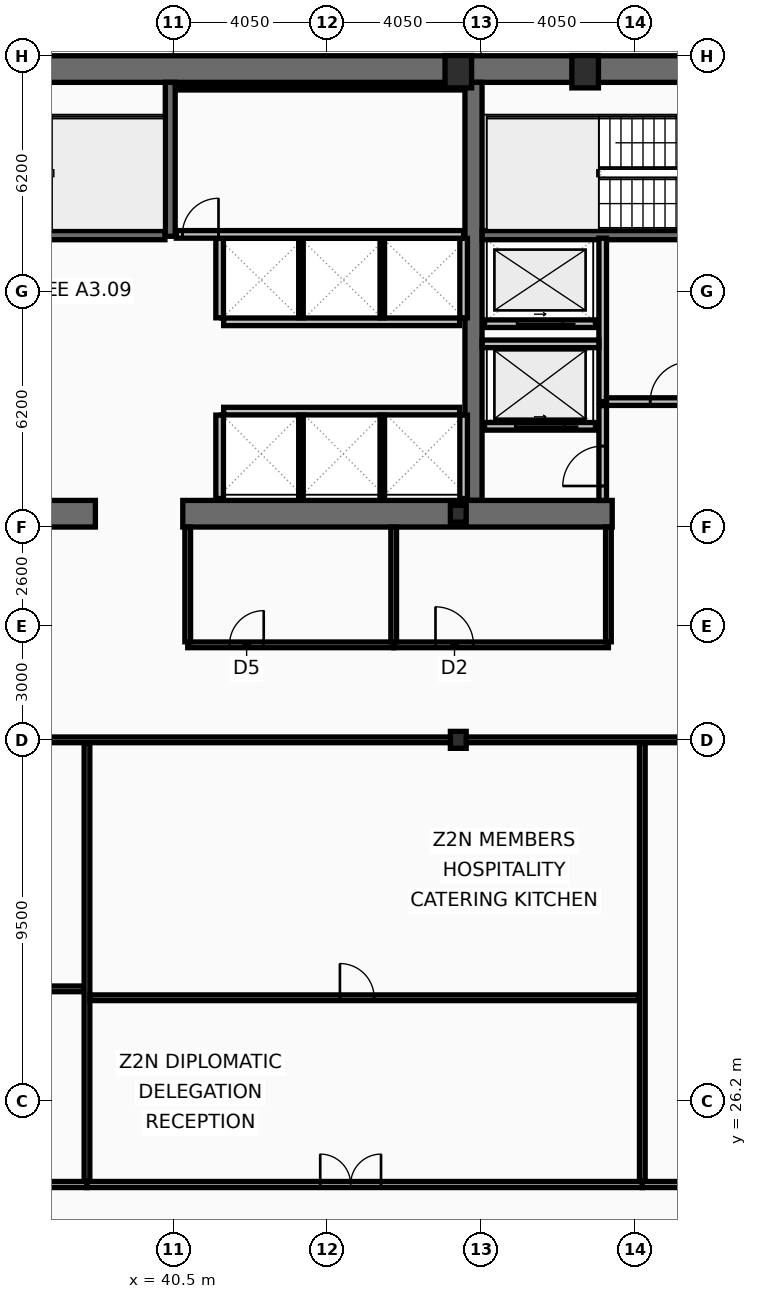
"""IFC4 building model, lengths in metres.
Left out: names, types, materials, properties, quantities, classifications, styles, units other than length and angle.
Written with IfcOpenShell. Run it as: python <this file> out.ifc"""

import sys

from ifc_helpers import new_model, si_unit, direction, frame, frame_2d, origin, origin_2d, place, context, subcontext, project, spatial, rectangle, hollow_rectangle, i_section, extrude, element, fill, save


model = new_model("IFC4")
c1 = context("Model", 3, precision=1e-05, world=origin(), true_north=direction((0.0, 1.0)))
c2 = subcontext(c1, "Body", "Model", "MODEL_VIEW")
j1 = project(units=[si_unit("LENGTHUNIT", "METRE"), si_unit("PLANEANGLEUNIT", "RADIAN")], contexts=[c1])
p1 = place(None, origin())
s1 = spatial("IfcSite", under=j1, at=p1, CompositionType="ELEMENT")
p2 = place(p1, origin())
s2 = spatial("IfcBuilding", under=s1, at=p2, CompositionType="ELEMENT")
p3 = place(p2, frame((0.0, 0.0, 125.4)))
s3 = spatial("IfcBuildingStorey", under=s2, at=p3, CompositionType="ELEMENT", Elevation=125.4)
p4 = place(p3, frame((16.2, 53.35, 0.0), z_axis=(0.0, 0.0, 1.0), x_axis=(1.0, 0.0, 0.0)))
e1 = element("IfcWall", 1, at=p4, inside=s3, PredefinedType="SHEAR", context=c2, shape_type="SweptSolid", body=[
    extrude(rectangle(XDim=40.5, YDim=0.7, at=frame_2d((20.25, 0.0))), origin(), (0.0, 0.0, 1.0), 3.44),
])
p5 = place(p3, frame((48.4, 42.0, 0.0), z_axis=(0.0, 0.0, 1.0), x_axis=(0.0, 1.0, 0.0)))
e2 = element("IfcWall", 2, at=p5, inside=s3, PredefinedType="SHEAR", context=c2, shape_type="SweptSolid", body=[
    extrude(rectangle(XDim=11.0, YDim=0.45, at=frame_2d((5.5, 0.0))), origin(), (0.0, 0.0, 1.0), 3.44),
])
p6 = place(p3, frame((38.45, 41.65, 0.0), z_axis=(0.0, 0.0, 1.0), x_axis=(-1.0, 0.0, 0.0)))
e3 = element("IfcWall", 3, at=p6, inside=s3, PredefinedType="SHEAR", context=c2, shape_type="SweptSolid", body=[
    extrude(rectangle(XDim=3.75, YDim=0.7, at=frame_2d((1.875, 0.0))), origin(), (0.0, 0.0, 1.0), 3.44),
])
p7 = place(p3, frame((52.05, 41.65, 0.0), z_axis=(0.0, 0.0, 1.0), x_axis=(-1.0, 0.0, 0.0)))
e4 = element("IfcWall", 4, at=p7, inside=s3, PredefinedType="SHEAR", context=c2, shape_type="SweptSolid", body=[
    extrude(rectangle(XDim=11.3, YDim=0.7, at=frame_2d((5.65, 0.0))), origin(), (0.0, 0.0, 1.0), 3.44),
])
p8 = place(p3, frame((40.42, 48.95, 0.0), z_axis=(0.0, 0.0, 1.0), x_axis=(0.0, 1.0, 0.0)))
e5 = element("IfcWall", 5, at=p8, inside=s3, PredefinedType="SHEAR", context=c2, shape_type="SweptSolid", body=[
    extrude(rectangle(XDim=4.05, YDim=0.26, at=frame_2d((2.025, 0.0))), origin(), (0.0, 0.0, 1.0), 3.44),
])
p9 = place(p3, frame((48.63, 48.98, 0.0), z_axis=(0.0, 0.0, 1.0), x_axis=(1.0, 0.0, 0.0)))
e6 = element("IfcWall", 6, at=p9, inside=s3, PredefinedType="SHEAR", context=c2, shape_type="SweptSolid", body=[
    extrude(rectangle(XDim=7.37, YDim=0.24, at=frame_2d((3.685, 0.0))), origin(), (0.0, 0.0, 1.0), 3.44),
])
p10 = place(p9, frame((6.1, 0.0, 0.0)))
e7 = element("IfcOpeningElement", 7, at=p10, cuts=e6, PredefinedType="OPENING", context=c2, shape_type="SweptSolid", body=[
    extrude(rectangle(XDim=1.05, YDim=2.15, at=frame_2d((0.525, 1.075))), frame((0.0, 0.13, 0.0), z_axis=(0.0, -1.0, 0.0), x_axis=(1.0, 0.0, 0.0)), (0.0, 0.0, 1.0), 0.26),
])
p11 = place(p3, frame((32.72, 48.98, 0.0), z_axis=(0.0, 0.0, 1.0), x_axis=(1.0, 0.0, 0.0)))
e8 = element("IfcWall", 8, at=p11, inside=s3, PredefinedType="SHEAR", context=c2, shape_type="SweptSolid", body=[
    extrude(rectangle(XDim=7.56, YDim=0.24, at=frame_2d((3.78, 0.0))), origin(), (0.0, 0.0, 1.0), 3.44),
])
p12 = place(p11, frame((0.22, 0.0, 0.0)))
e9 = element("IfcOpeningElement", 9, at=p12, cuts=e8, PredefinedType="OPENING", context=c2, shape_type="SweptSolid", body=[
    extrude(rectangle(XDim=1.05, YDim=2.15, at=frame_2d((0.525, 1.075))), frame((0.0, 0.13, 0.0), z_axis=(0.0, -1.0, 0.0), x_axis=(1.0, 0.0, 0.0)), (0.0, 0.0, 1.0), 0.26),
])
for number, where, z_axis, x_axis in (
    (10, (48.0, 53.28, 0.0), (0.0, 0.0, 1.0), (1.0, 0.0, 0.0)),
    (11, (51.337, 53.28, 0.0), (0.0, 0.0, 1.0), (1.0, 0.0, 0.0)),
):
    element("IfcColumn", number, at=place(p3, frame(where, z_axis=z_axis, x_axis=x_axis)), inside=s3, PredefinedType="COLUMN", context=c2, shape_type="SweptSolid", body=[
        extrude(hollow_rectangle(XDim=0.7, YDim=0.85, WallThickness=0.05, at=origin_2d()), origin(), (0.0, 0.0, 1.0), 3.6),
    ])
for number, where, z_axis, x_axis in (
    (12, (48.0, 35.7, 0.0), (0.0, 0.0, 1.0), (1.0, 0.0, 0.0)),
    (13, (48.0, 41.65, 0.0), (0.0, 0.0, 1.0), (1.0, 0.0, 0.0)),
):
    element("IfcColumn", number, at=place(p3, frame(where, z_axis=z_axis, x_axis=x_axis)), inside=s3, PredefinedType="COLUMN", context=c2, shape_type="SweptSolid", body=[
        extrude(i_section(OverallWidth=0.416, OverallDepth=0.446, WebThickness=0.039, FlangeThickness=0.063, at=origin_2d()), origin(), (0.0, 0.0, 1.0), 3.6),
    ])
p13 = place(p3, frame((51.61, 43.95, 0.0), z_axis=(0.0, 0.0, 1.0), x_axis=(-1.0, 0.0, 0.0)))
e14 = element("IfcWall", 14, at=p13, inside=s3, PredefinedType="PARTITIONING", context=c2, shape_type="SweptSolid", body=[
    extrude(rectangle(XDim=2.92, YDim=0.2, at=frame_2d((1.46, 0.0))), origin(), (0.0, 0.0, 1.0), 3.44),
])
p14 = place(p13, frame((0.81, 0.0, 0.0)))
e15 = element("IfcOpeningElement", 15, at=p14, cuts=e14, PredefinedType="OPENING", context=c2, shape_type="SweptSolid", body=[
    extrude(rectangle(XDim=1.3, YDim=2.18, at=frame_2d((0.65, 1.09))), frame((0.0, 0.11, 0.0), z_axis=(0.0, -1.0, 0.0), x_axis=(1.0, 0.0, 0.0)), (0.0, 0.0, 1.0), 0.22),
])
p15 = place(p3, frame((51.61, 46.65, 0.0), z_axis=(0.0, 0.0, 1.0), x_axis=(-1.0, 0.0, 0.0)))
e16 = element("IfcWall", 16, at=p15, inside=s3, PredefinedType="PARTITIONING", context=c2, shape_type="SweptSolid", body=[
    extrude(rectangle(XDim=2.92, YDim=0.2, at=frame_2d((1.46, 0.0))), origin(), (0.0, 0.0, 1.0), 3.44),
])
p16 = place(p15, frame((0.86, 0.0, 0.0)))
e17 = element("IfcOpeningElement", 17, at=p16, cuts=e16, PredefinedType="OPENING", context=c2, shape_type="SweptSolid", body=[
    extrude(rectangle(XDim=1.2, YDim=2.18, at=frame_2d((0.6, 1.09))), frame((0.0, 0.11, 0.0), z_axis=(0.0, -1.0, 0.0), x_axis=(1.0, 0.0, 0.0)), (0.0, 0.0, 1.0), 0.22),
])
p17 = place(p3, frame((51.8, 44.6, 0.0), z_axis=(0.0, 0.0, 1.0), x_axis=(0.0, 1.0, 0.0)))
e18 = element("IfcWall", 18, at=p17, inside=s3, PredefinedType="PARTITIONING", context=c2, shape_type="SweptSolid", body=[
    extrude(rectangle(XDim=4.3, YDim=0.2, at=frame_2d((2.15, 0.0))), origin(), (0.0, 0.0, 1.0), 3.44),
])
p18 = place(p3, frame((51.9, 44.6, 0.0), z_axis=(0.0, 0.0, 1.0), x_axis=(1.0, 0.0, 0.0)))
e19 = element("IfcWall", 19, at=p18, inside=s3, PredefinedType="PARTITIONING", context=c2, shape_type="SweptSolid", body=[
    extrude(rectangle(XDim=4.1, YDim=0.2, at=frame_2d((2.05, 0.0))), origin(), (0.0, 0.0, 1.0), 3.44),
])
p19 = place(p18, frame((1.15, 0.0, 0.0)))
e20 = element("IfcOpeningElement", 20, at=p19, cuts=e19, PredefinedType="OPENING", context=c2, shape_type="SweptSolid", body=[
    extrude(rectangle(XDim=1.05, YDim=2.15, at=frame_2d((0.525, 1.075))), frame((0.0, 0.11, 0.0), z_axis=(0.0, -1.0, 0.0), x_axis=(1.0, 0.0, 0.0)), (0.0, 0.0, 1.0), 0.22),
])
p20 = place(p3, frame((48.63, 46.12, 0.0), z_axis=(0.0, 0.0, 1.0), x_axis=(1.0, 0.0, 0.0)))
e21 = element("IfcWall", 21, at=p20, inside=s3, PredefinedType="PARTITIONING", context=c2, shape_type="SweptSolid", body=[
    extrude(rectangle(XDim=3.07, YDim=0.2, at=frame_2d((1.535, 0.0))), origin(), (0.0, 0.0, 1.0), 3.44),
])
p21 = place(p3, frame((51.8, 42.0, 0.0), z_axis=(0.0, 0.0, 1.0), x_axis=(0.0, 1.0, 0.0)))
e22 = element("IfcWall", 22, at=p21, inside=s3, PredefinedType="PARTITIONING", context=c2, shape_type="SweptSolid", body=[
    extrude(rectangle(XDim=2.495, YDim=0.2, at=frame_2d((1.248, 0.0))), origin(), (0.0, 0.0, 1.0), 3.44),
])
p22 = place(p21, frame((0.38, 0.0, 0.0)))
e23 = element("IfcOpeningElement", 23, at=p22, cuts=e22, PredefinedType="OPENING", context=c2, shape_type="SweptSolid", body=[
    extrude(rectangle(XDim=1.05, YDim=2.15, at=frame_2d((0.525, 1.075))), frame((0.0, 0.11, 0.0), z_axis=(0.0, -1.0, 0.0), x_axis=(1.0, 0.0, 0.0)), (0.0, 0.0, 1.0), 0.22),
])
p23 = place(p3, frame((41.825, 46.7, 0.0), z_axis=(0.0, 0.0, 1.0), x_axis=(1.0, 0.0, 0.0)))
e24 = element("IfcWall", 24, at=p23, inside=s3, PredefinedType="PARTITIONING", context=c2, shape_type="SweptSolid", body=[
    extrude(rectangle(XDim=6.21, YDim=0.2, at=frame_2d((3.105, 0.0))), origin(), (0.0, 0.0, 1.0), 3.44),
])
for number, where, z_axis, x_axis in (
    (25, (41.72, 46.805, 0.0), (0.0, 0.0, 1.0), (0.0, 1.0, 0.0)),
    (26, (48.14, 46.805, 0.0), (0.0, 0.0, 1.0), (0.0, 1.0, 0.0)),
):
    element("IfcWall", number, at=place(p3, frame(where, z_axis=z_axis, x_axis=x_axis)), inside=s3, PredefinedType="PARTITIONING", context=c2, shape_type="SweptSolid", body=[
        extrude(rectangle(XDim=2.09, YDim=0.2, at=frame_2d((1.045, 0.0))), origin(), (0.0, 0.0, 1.0), 3.44),
    ])
for number, where, z_axis, x_axis in (
    (27, (43.86, 46.805, 0.0), (0.0, 0.0, 1.0), (0.0, 1.0, 0.0)),
    (28, (46.0, 46.805, 0.0), (0.0, 0.0, 1.0), (0.0, 1.0, 0.0)),
):
    element("IfcWall", number, at=place(p3, frame(where, z_axis=z_axis, x_axis=x_axis)), inside=s3, PredefinedType="PARTITIONING", context=c2, shape_type="SweptSolid", body=[
        extrude(rectangle(XDim=2.09, YDim=0.12, at=frame_2d((1.045, 0.0))), origin(), (0.0, 0.0, 1.0), 3.44),
    ])
p24 = place(p3, frame((41.825, 44.35, 0.0), z_axis=(0.0, 0.0, 1.0), x_axis=(1.0, 0.0, 0.0)))
e29 = element("IfcWall", 29, at=p24, inside=s3, PredefinedType="PARTITIONING", context=c2, shape_type="SweptSolid", body=[
    extrude(rectangle(XDim=6.21, YDim=0.2, at=frame_2d((3.105, 0.0))), origin(), (0.0, 0.0, 1.0), 3.44),
])
for number, where, z_axis, x_axis in (
    (30, (41.72, 42.05, 0.0), (0.0, 0.0, 1.0), (0.0, 1.0, 0.0)),
    (31, (48.14, 42.05, 0.0), (0.0, 0.0, 1.0), (0.0, 1.0, 0.0)),
):
    element("IfcWall", number, at=place(p3, frame(where, z_axis=z_axis, x_axis=x_axis)), inside=s3, PredefinedType="PARTITIONING", context=c2, shape_type="SweptSolid", body=[
        extrude(rectangle(XDim=2.195, YDim=0.2, at=frame_2d((1.098, 0.0))), origin(), (0.0, 0.0, 1.0), 3.44),
    ])
for number, where, z_axis, x_axis in (
    (32, (43.86, 42.05, 0.0), (0.0, 0.0, 1.0), (0.0, 1.0, 0.0)),
    (33, (46.0, 42.05, 0.0), (0.0, 0.0, 1.0), (0.0, 1.0, 0.0)),
):
    element("IfcWall", number, at=place(p3, frame(where, z_axis=z_axis, x_axis=x_axis)), inside=s3, PredefinedType="PARTITIONING", context=c2, shape_type="SweptSolid", body=[
        extrude(rectangle(XDim=2.195, YDim=0.12, at=frame_2d((1.098, 0.0))), origin(), (0.0, 0.0, 1.0), 3.44),
    ])
p25 = place(p3, frame((40.58, 52.86, 0.0), z_axis=(0.0, 0.0, 1.0), x_axis=(1.0, 0.0, 0.0)))
e34 = element("IfcWall", 34, at=p25, inside=s3, PredefinedType="PARTITIONING", context=c2, shape_type="SweptSolid", body=[
    extrude(rectangle(XDim=7.56, YDim=0.12, at=frame_2d((3.78, 0.0))), origin(), (0.0, 0.0, 1.0), 3.44),
])
p26 = place(p3, frame((40.58, 49.0, 0.0), z_axis=(0.0, 0.0, 1.0), x_axis=(1.0, 0.0, 0.0)))
e35 = element("IfcWall", 35, at=p26, inside=s3, PredefinedType="PARTITIONING", context=c2, shape_type="SweptSolid", body=[
    extrude(rectangle(XDim=7.56, YDim=0.2, at=frame_2d((3.78, 0.0))), origin(), (0.0, 0.0, 1.0), 3.44),
])
p27 = place(p26, frame((0.16, 0.0, 0.0)))
e36 = element("IfcOpeningElement", 36, at=p27, cuts=e35, PredefinedType="OPENING", context=c2, shape_type="SweptSolid", body=[
    extrude(rectangle(XDim=0.95, YDim=2.1, at=frame_2d((0.475, 1.05))), frame((0.0, 0.11, 0.0), z_axis=(0.0, -1.0, 0.0), x_axis=(1.0, 0.0, 0.0)), (0.0, 0.0, 1.0), 0.22),
])
p28 = place(p3, frame((40.88, 38.2, 0.0), z_axis=(0.0, 0.0, 1.0), x_axis=(1.0, 0.0, 0.0)))
e37 = element("IfcWall", 37, at=p28, inside=s3, PredefinedType="PARTITIONING", context=c2, shape_type="SweptSolid", body=[
    extrude(rectangle(XDim=5.42, YDim=0.15, at=frame_2d((2.71, 0.0))), origin(), (0.0, 0.0, 1.0), 2.73),
])
p29 = place(p28, frame((1.1, 0.0, 0.0)))
e38 = element("IfcOpeningElement", 38, at=p29, cuts=e37, PredefinedType="OPENING", context=c2, shape_type="SweptSolid", body=[
    extrude(rectangle(XDim=0.9, YDim=2.05, at=frame_2d((0.45, 1.025))), frame((0.0, 0.085, 0.0), z_axis=(0.0, -1.0, 0.0), x_axis=(1.0, 0.0, 0.0)), (0.0, 0.0, 1.0), 0.17),
])
p30 = place(p3, frame((46.3, 38.2, 0.0), z_axis=(0.0, 0.0, 1.0), x_axis=(1.0, 0.0, 0.0)))
e39 = element("IfcWall", 39, at=p30, inside=s3, PredefinedType="PARTITIONING", context=c2, shape_type="SweptSolid", body=[
    extrude(rectangle(XDim=5.65, YDim=0.15, at=frame_2d((2.825, 0.0))), origin(), (0.0, 0.0, 1.0), 2.73),
])
p31 = place(p30, frame((1.1, 0.0, 0.0)))
e40 = element("IfcOpeningElement", 40, at=p31, cuts=e39, PredefinedType="OPENING", context=c2, shape_type="SweptSolid", body=[
    extrude(rectangle(XDim=1.0, YDim=2.05, at=frame_2d((0.5, 1.025))), frame((0.0, 0.085, 0.0), z_axis=(0.0, -1.0, 0.0), x_axis=(1.0, 0.0, 0.0)), (0.0, 0.0, 1.0), 0.17),
])
for number, where, z_axis, x_axis in (
    (41, (40.88, 38.28, 0.0), (0.0, 0.0, 1.0), (0.0, 1.0, 0.0)),
    (42, (46.3, 38.28, 0.0), (0.0, 0.0, 1.0), (0.0, 1.0, 0.0)),
    (43, (51.95, 38.28, 0.0), (0.0, 0.0, 1.0), (0.0, 1.0, 0.0)),
):
    element("IfcWall", number, at=place(p3, frame(where, z_axis=z_axis, x_axis=x_axis)), inside=s3, PredefinedType="PARTITIONING", context=c2, shape_type="SweptSolid", body=[
        extrude(rectangle(XDim=3.02, YDim=0.15, at=frame_2d((1.51, 0.0))), origin(), (0.0, 0.0, 1.0), 3.44),
    ])
p32 = place(p3, frame((21.81, 35.7, 0.0), z_axis=(0.0, 0.0, 1.0), x_axis=(1.0, 0.0, 0.0)))
e44 = element("IfcWall", 44, at=p32, inside=s3, PredefinedType="PARTITIONING", context=c2, shape_type="SweptSolid", body=[
    extrude(rectangle(XDim=46.995, YDim=0.15, at=frame_2d((23.498, 0.0))), origin(), (0.0, 0.0, 1.0), 2.73),
])
p33 = place(p3, frame((30.215, 24.0, 0.0), z_axis=(0.0, 0.0, 1.0), x_axis=(1.0, 0.0, 0.0)))
e45 = element("IfcWall", 45, at=p33, inside=s3, PredefinedType="PARTITIONING", context=c2, shape_type="SweptSolid", body=[
    extrude(rectangle(XDim=8.014, YDim=0.16, at=frame_2d((4.007, 0.0))), origin(), (0.0, 0.0, 1.0), 2.73),
])
p34 = place(p33, frame((3.366, 0.0, 0.0)))
e46 = element("IfcOpeningElement", 46, at=p34, cuts=e45, PredefinedType="OPENING", context=c2, shape_type="SweptSolid", body=[
    extrude(rectangle(XDim=1.0, YDim=2.05, at=frame_2d((0.5, 1.025))), frame((0.0, 0.09, 0.0), z_axis=(0.0, -1.0, 0.0), x_axis=(1.0, 0.0, 0.0)), (0.0, 0.0, 1.0), 0.18),
])
p35 = place(p3, frame((30.295, 29.148, 0.0), z_axis=(0.0, 0.0, 1.0), x_axis=(1.0, 0.0, 0.0)))
e47 = element("IfcWall", 47, at=p35, inside=s3, PredefinedType="PARTITIONING", context=c2, shape_type="SweptSolid", body=[
    extrude(rectangle(XDim=7.854, YDim=0.15, at=frame_2d((3.927, 0.0))), origin(), (0.0, 0.0, 1.0), 2.73),
])
p36 = place(p35, frame((3.606, 0.0, 0.0)))
e48 = element("IfcOpeningElement", 48, at=p36, cuts=e47, PredefinedType="OPENING", context=c2, shape_type="SweptSolid", body=[
    extrude(rectangle(XDim=0.9, YDim=2.05, at=frame_2d((0.45, 1.025))), frame((0.0, 0.085, 0.0), z_axis=(0.0, -1.0, 0.0), x_axis=(1.0, 0.0, 0.0)), (0.0, 0.0, 1.0), 0.17),
])
p37 = place(p3, frame((38.229, 24.0, 0.0), z_axis=(0.0, 0.0, 1.0), x_axis=(1.0, 0.0, 0.0)))
e49 = element("IfcWall", 49, at=p37, inside=s3, PredefinedType="PARTITIONING", context=c2, shape_type="SweptSolid", body=[
    extrude(rectangle(XDim=14.613, YDim=0.16, at=frame_2d((7.307, 0.0))), origin(), (0.0, 0.0, 1.0), 2.73),
])
p38 = place(p37, frame((6.138, 0.0, 0.0)))
e50 = element("IfcOpeningElement", 50, at=p38, cuts=e49, PredefinedType="OPENING", context=c2, shape_type="SweptSolid", body=[
    extrude(rectangle(XDim=1.6, YDim=2.15, at=frame_2d((0.8, 1.075))), frame((0.0, 0.09, 0.0), z_axis=(0.0, -1.0, 0.0), x_axis=(1.0, 0.0, 0.0)), (0.0, 0.0, 1.0), 0.18),
])
p39 = place(p3, frame((38.229, 24.085, 0.0), z_axis=(0.0, 0.0, 1.0), x_axis=(0.0, 1.0, 0.0)))
e51 = element("IfcWall", 51, at=p39, inside=s3, PredefinedType="PARTITIONING", context=c2, shape_type="SweptSolid", body=[
    extrude(rectangle(XDim=11.535, YDim=0.15, at=frame_2d((5.768, 0.0))), origin(), (0.0, 0.0, 1.0), 2.88),
])
p40 = place(p3, frame((38.309, 28.914, 0.0), z_axis=(0.0, 0.0, 1.0), x_axis=(1.0, 0.0, 0.0)))
e52 = element("IfcWall", 52, at=p40, inside=s3, PredefinedType="PARTITIONING", context=c2, shape_type="SweptSolid", body=[
    extrude(rectangle(XDim=14.453, YDim=0.15, at=frame_2d((7.227, 0.0))), origin(), (0.0, 0.0, 1.0), 2.73),
])
p41 = place(p40, frame((6.576, 0.0, 0.0)))
e53 = element("IfcOpeningElement", 53, at=p41, cuts=e52, PredefinedType="OPENING", context=c2, shape_type="SweptSolid", body=[
    extrude(rectangle(XDim=0.9, YDim=2.05, at=frame_2d((0.45, 1.025))), frame((0.0, 0.085, 0.0), z_axis=(0.0, -1.0, 0.0), x_axis=(1.0, 0.0, 0.0)), (0.0, 0.0, 1.0), 0.17),
])
p42 = place(p3, frame((52.842, 24.0, 0.0), z_axis=(0.0, 0.0, 1.0), x_axis=(1.0, 0.0, 0.0)))
e54 = element("IfcWall", 54, at=p42, inside=s3, PredefinedType="PARTITIONING", context=c2, shape_type="SweptSolid", body=[
    extrude(rectangle(XDim=7.542, YDim=0.16, at=frame_2d((3.771, 0.0))), origin(), (0.0, 0.0, 1.0), 2.73),
])
p43 = place(p42, frame((3.168, 0.0, 0.0)))
e55 = element("IfcOpeningElement", 55, at=p43, cuts=e54, PredefinedType="OPENING", context=c2, shape_type="SweptSolid", body=[
    extrude(rectangle(XDim=1.0, YDim=2.05, at=frame_2d((0.5, 1.025))), frame((0.0, 0.09, 0.0), z_axis=(0.0, -1.0, 0.0), x_axis=(1.0, 0.0, 0.0)), (0.0, 0.0, 1.0), 0.18),
])
p44 = place(p3, frame((52.842, 24.085, 0.0), z_axis=(0.0, 0.0, 1.0), x_axis=(0.0, 1.0, 0.0)))
e56 = element("IfcWall", 56, at=p44, inside=s3, PredefinedType="PARTITIONING", context=c2, shape_type="SweptSolid", body=[
    extrude(rectangle(XDim=11.535, YDim=0.15, at=frame_2d((5.768, 0.0))), origin(), (0.0, 0.0, 1.0), 2.88),
])
p45 = place(p14, origin())
e57 = element("IfcDoor", 57, at=p45, inside=s3, OperationType="SLIDING_TO_LEFT", PredefinedType="DOOR", context=c2, shape_type="SweptSolid", body=[
    extrude(rectangle(XDim=1.3, YDim=2.18, at=frame_2d((0.65, 1.09))), frame((0.0, 0.025, 0.0), z_axis=(0.0, -1.0, 0.0), x_axis=(1.0, 0.0, 0.0)), (0.0, 0.0, 1.0), 0.05),
])
fill(e15, e57)
p46 = place(p16, origin())
e58 = element("IfcDoor", 58, at=p46, inside=s3, OperationType="SLIDING_TO_LEFT", PredefinedType="DOOR", context=c2, shape_type="SweptSolid", body=[
    extrude(rectangle(XDim=1.2, YDim=2.18, at=frame_2d((0.6, 1.09))), frame((0.0, 0.025, 0.0), z_axis=(0.0, -1.0, 0.0), x_axis=(1.0, 0.0, 0.0)), (0.0, 0.0, 1.0), 0.05),
])
fill(e17, e58)
p47 = place(p19, origin())
e59 = element("IfcDoor", 59, at=p47, inside=s3, OperationType="SINGLE_SWING_RIGHT", PredefinedType="DOOR", context=c2, shape_type="SweptSolid", body=[
    extrude(rectangle(XDim=1.05, YDim=2.15, at=frame_2d((0.525, 1.075))), frame((0.0, 0.025, 0.0), z_axis=(0.0, -1.0, 0.0), x_axis=(1.0, 0.0, 0.0)), (0.0, 0.0, 1.0), 0.05),
])
fill(e20, e59)
p48 = place(p22, origin())
e60 = element("IfcDoor", 60, at=p48, inside=s3, OperationType="SINGLE_SWING_LEFT", PredefinedType="DOOR", context=c2, shape_type="SweptSolid", body=[
    extrude(rectangle(XDim=1.05, YDim=2.15, at=frame_2d((0.525, 1.075))), frame((0.0, 0.025, 0.0), z_axis=(0.0, -1.0, 0.0), x_axis=(1.0, 0.0, 0.0)), (0.0, 0.0, 1.0), 0.05),
])
fill(e23, e60)
p49 = place(p27, origin())
e61 = element("IfcDoor", 61, at=p49, inside=s3, OperationType="SINGLE_SWING_RIGHT", PredefinedType="DOOR", context=c2, shape_type="SweptSolid", body=[
    extrude(rectangle(XDim=0.95, YDim=2.1, at=frame_2d((0.475, 1.05))), frame((0.0, 0.025, 0.0), z_axis=(0.0, -1.0, 0.0), x_axis=(1.0, 0.0, 0.0)), (0.0, 0.0, 1.0), 0.05),
])
fill(e36, e61)
p50 = place(p29, origin())
e62 = element("IfcDoor", 62, at=p50, inside=s3, OperationType="SINGLE_SWING_RIGHT", PredefinedType="DOOR", context=c2, shape_type="SweptSolid", body=[
    extrude(rectangle(XDim=0.9, YDim=2.05, at=frame_2d((0.45, 1.025))), frame((0.0, 0.025, 0.0), z_axis=(0.0, -1.0, 0.0), x_axis=(1.0, 0.0, 0.0)), (0.0, 0.0, 1.0), 0.05),
])
fill(e38, e62)
p51 = place(p31, origin())
e63 = element("IfcDoor", 63, at=p51, inside=s3, OperationType="SINGLE_SWING_LEFT", PredefinedType="DOOR", context=c2, shape_type="SweptSolid", body=[
    extrude(rectangle(XDim=1.0, YDim=2.05, at=frame_2d((0.5, 1.025))), frame((0.0, 0.025, 0.0), z_axis=(0.0, -1.0, 0.0), x_axis=(1.0, 0.0, 0.0)), (0.0, 0.0, 1.0), 0.05),
])
fill(e40, e63)
p52 = place(p38, origin())
e64 = element("IfcDoor", 64, at=p52, inside=s3, OperationType="DOUBLE_DOOR_SINGLE_SWING", PredefinedType="DOOR", context=c2, shape_type="SweptSolid", body=[
    extrude(rectangle(XDim=1.6, YDim=2.15, at=frame_2d((0.8, 1.075))), frame((0.0, 0.025, 0.0), z_axis=(0.0, -1.0, 0.0), x_axis=(1.0, 0.0, 0.0)), (0.0, 0.0, 1.0), 0.05),
])
fill(e50, e64)
p53 = place(p41, origin())
e65 = element("IfcDoor", 65, at=p53, inside=s3, OperationType="SINGLE_SWING_LEFT", PredefinedType="DOOR", context=c2, shape_type="SweptSolid", body=[
    extrude(rectangle(XDim=0.9, YDim=2.05, at=frame_2d((0.45, 1.025))), frame((0.0, 0.025, 0.0), z_axis=(0.0, -1.0, 0.0), x_axis=(1.0, 0.0, 0.0)), (0.0, 0.0, 1.0), 0.05),
])
fill(e53, e65)
save(model, sys.argv[1])
